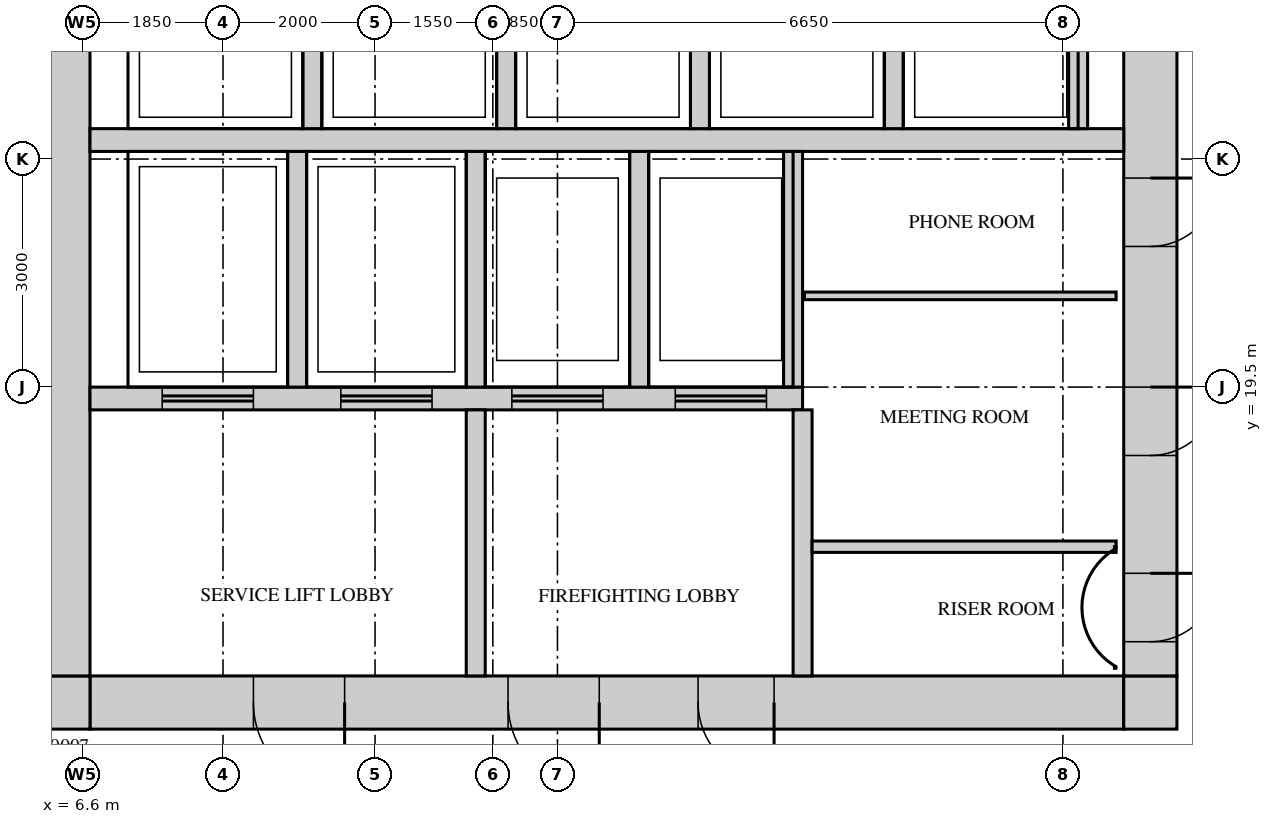
"""IFC4 building model, lengths in metres.
Left out: names, types, materials, properties, quantities, classifications, styles, units other than length and angle.
Written with IfcOpenShell. Run it as: python <this file> out.ifc"""

import sys

from ifc_helpers import new_model, si_unit, direction, frame, frame_2d, origin, place, context, subcontext, project, spatial, rectangle, extrude, source, transform, mapped, element, fill, save


model = new_model("IFC4")
c1 = context("Model", 3, precision=1e-05, world=origin(), true_north=direction((0.0, 1.0)))
c2 = subcontext(c1, "Body", "Model", "MODEL_VIEW")
j1 = project(units=[si_unit("LENGTHUNIT", "METRE"), si_unit("PLANEANGLEUNIT", "RADIAN")], contexts=[c1])
p1 = place(None, origin())
s1 = spatial("IfcSite", under=j1, at=p1, CompositionType="ELEMENT")
p2 = place(p1, origin())
s2 = spatial("IfcBuilding", under=s1, at=p2, CompositionType="ELEMENT")
p3 = place(p2, frame((0.0, 0.0, 250.2)))
s3 = spatial("IfcBuildingStorey", under=s2, at=p3, CompositionType="ELEMENT", Elevation=250.2)
m1 = source(origin(), c2, "Body", "SweptSolid", [
    extrude(rectangle(XDim=13.6, YDim=0.7, at=frame_2d((6.8, 0.0))), origin(), (0.0, 0.0, 1.0), 3.75),
])
p4 = place(p3, frame((6.7, 15.35, 0.0), z_axis=(0.0, 0.0, 1.0), x_axis=(1.0, 0.0, 0.0)))
e1 = element("IfcWall", 1, at=p4, inside=s3, PredefinedType="SHEAR", context=c2, shape_type="MappedRepresentation", body=[
    mapped(m1, transform((0.0, 0.0, 0.0))),
])
m2 = source(origin(), c2, "Body", "SweptSolid", [
    extrude(rectangle(XDim=1.2, YDim=2.1, at=frame_2d((0.6, 1.05))), frame((0.0, 0.36, 0.0), z_axis=(0.0, -1.0, 0.0), x_axis=(1.0, 0.0, 0.0)), (0.0, 0.0, 1.0), 0.72),
])
p5 = place(p4, frame((5.5, 0.0, 0.0)))
e2 = element("IfcOpeningElement", 2, at=p5, cuts=e1, PredefinedType="OPENING", context=c2, shape_type="MappedRepresentation", body=[
    mapped(m2, transform((0.0, 0.0, 0.0))),
])
p6 = place(p4, frame((2.15, 0.0, 0.0)))
e3 = element("IfcOpeningElement", 3, at=p6, cuts=e1, PredefinedType="OPENING", context=c2, shape_type="MappedRepresentation", body=[
    mapped(m2, transform((0.0, 0.0, 0.0))),
])
m3 = source(origin(), c2, "Body", "SweptSolid", [
    extrude(rectangle(XDim=1.0, YDim=2.1, at=frame_2d((0.5, 1.05))), frame((0.0, 0.36, 0.0), z_axis=(0.0, -1.0, 0.0), x_axis=(1.0, 0.0, 0.0)), (0.0, 0.0, 1.0), 0.72),
])
p7 = place(p4, frame((8.0, 0.0, 0.0)))
e4 = element("IfcOpeningElement", 4, at=p7, cuts=e1, PredefinedType="OPENING", context=c2, shape_type="MappedRepresentation", body=[
    mapped(m3, transform((0.0, 0.0, 0.0))),
])
m4 = source(origin(), c2, "Body", "SweptSolid", [
    extrude(rectangle(XDim=0.7, YDim=0.7, at=frame_2d((0.35, 0.0))), origin(), (0.0, 0.0, 1.0), 3.75),
])
for number, where, z_axis, x_axis in (
    (5, (20.3, 15.35, 0.0), (0.0, 0.0, 1.0), (1.0, 0.0, 0.0)),
    (6, (6.0, 15.35, 0.0), (0.0, 0.0, 1.0), (1.0, 0.0, 0.0)),
):
    element("IfcWall", number, at=place(p3, frame(where, z_axis=z_axis, x_axis=x_axis)), inside=s3, PredefinedType="SHEAR", context=c2, shape_type="MappedRepresentation", body=[
        mapped(m4, transform((0.0, 0.0, 0.0))),
    ])
m5 = source(origin(), c2, "Body", "SweptSolid", [
    extrude(rectangle(XDim=22.6, YDim=0.7, at=frame_2d((11.3, 0.0))), origin(), (0.0, 0.0, 1.0), 3.75),
])
p8 = place(p3, frame((20.65, 15.7, 0.0), z_axis=(0.0, 0.0, 1.0), x_axis=(0.0, 1.0, 0.0)))
e7 = element("IfcWall", 7, at=p8, inside=s3, PredefinedType="SHEAR", context=c2, shape_type="MappedRepresentation", body=[
    mapped(m5, transform((0.0, 0.0, 0.0))),
])
m6 = source(origin(), c2, "Body", "SweptSolid", [
    extrude(rectangle(XDim=1.8, YDim=2.1, at=frame_2d((0.9, 1.05))), frame((0.0, 0.36, 0.0), z_axis=(0.0, -1.0, 0.0), x_axis=(1.0, 0.0, 0.0)), (0.0, 0.0, 1.0), 0.72),
])
p9 = place(p8, frame((10.8, 0.0, 0.0)))
e8 = element("IfcOpeningElement", 8, at=p9, cuts=e7, PredefinedType="OPENING", context=c2, shape_type="MappedRepresentation", body=[
    mapped(m6, transform((0.0, 0.0, 0.0))),
])
m7 = source(origin(), c2, "Body", "SweptSolid", [
    extrude(rectangle(XDim=0.9, YDim=2.1, at=frame_2d((0.45, 1.05))), frame((0.0, 0.36, 0.0), z_axis=(0.0, -1.0, 0.0), x_axis=(1.0, 0.0, 0.0)), (0.0, 0.0, 1.0), 0.72),
])
p10 = place(p8, frame((0.45, 0.0, 0.0)))
e9 = element("IfcOpeningElement", 9, at=p10, cuts=e7, PredefinedType="OPENING", context=c2, shape_type="MappedRepresentation", body=[
    mapped(m7, transform((0.0, 0.0, 0.0))),
])
p11 = place(p8, frame((2.9, 0.0, 0.0)))
e10 = element("IfcOpeningElement", 10, at=p11, cuts=e7, PredefinedType="OPENING", context=c2, shape_type="MappedRepresentation", body=[
    mapped(m7, transform((0.0, 0.0, 0.0))),
])
p12 = place(p8, frame((5.65, 0.0, 0.0)))
e11 = element("IfcOpeningElement", 11, at=p12, cuts=e7, PredefinedType="OPENING", context=c2, shape_type="MappedRepresentation", body=[
    mapped(m7, transform((0.0, 0.0, 0.0))),
])
p13 = place(p3, frame((6.35, 15.7, 0.0), z_axis=(0.0, 0.0, 1.0), x_axis=(0.0, 1.0, 0.0)))
e12 = element("IfcWall", 12, at=p13, inside=s3, PredefinedType="SHEAR", context=c2, shape_type="MappedRepresentation", body=[
    mapped(m5, transform((0.0, 0.0, 0.0))),
])
m8 = source(origin(), c2, "Body", "SweptSolid", [
    extrude(rectangle(XDim=13.6, YDim=0.3, at=frame_2d((6.8, 0.0))), origin(), (0.0, 0.0, 1.0), 3.75),
])
p14 = place(p3, frame((6.7, 22.75, 0.0), z_axis=(0.0, 0.0, 1.0), x_axis=(1.0, 0.0, 0.0)))
e13 = element("IfcWall", 13, at=p14, inside=s3, PredefinedType="STANDARD", context=c2, shape_type="MappedRepresentation", body=[
    mapped(m8, transform((0.0, 0.0, 0.0))),
])
m9 = source(origin(), c2, "Body", "SweptSolid", [
    extrude(rectangle(XDim=9.375, YDim=0.3, at=frame_2d((4.688, 0.0))), origin(), (0.0, 0.0, 1.0), 3.75),
])
p15 = place(p3, frame((6.7, 19.35, 0.0), z_axis=(0.0, 0.0, 1.0), x_axis=(1.0, 0.0, 0.0)))
e14 = element("IfcWall", 14, at=p15, inside=s3, PredefinedType="STANDARD", context=c2, shape_type="MappedRepresentation", body=[
    mapped(m9, transform((0.0, 0.0, 0.0))),
])
m10 = source(origin(), c2, "Body", "SweptSolid", [
    extrude(rectangle(XDim=1.2, YDim=2.1, at=frame_2d((0.6, 1.05))), frame((0.0, 0.16, 0.0), z_axis=(0.0, -1.0, 0.0), x_axis=(1.0, 0.0, 0.0)), (0.0, 0.0, 1.0), 0.32),
])
p16 = place(p15, frame((0.95, 0.0, 0.0)))
e15 = element("IfcOpeningElement", 15, at=p16, cuts=e14, PredefinedType="OPENING", context=c2, shape_type="MappedRepresentation", body=[
    mapped(m10, transform((0.0, 0.0, 0.0))),
])
p17 = place(p15, frame((3.3, 0.0, 0.0)))
e16 = element("IfcOpeningElement", 16, at=p17, cuts=e14, PredefinedType="OPENING", context=c2, shape_type="MappedRepresentation", body=[
    mapped(m10, transform((0.0, 0.0, 0.0))),
])
p18 = place(p15, frame((5.55, 0.0, 0.0)))
e17 = element("IfcOpeningElement", 17, at=p18, cuts=e14, PredefinedType="OPENING", context=c2, shape_type="MappedRepresentation", body=[
    mapped(m10, transform((0.0, 0.0, 0.0))),
])
p19 = place(p15, frame((7.7, 0.0, 0.0)))
e18 = element("IfcOpeningElement", 18, at=p19, cuts=e14, PredefinedType="OPENING", context=c2, shape_type="MappedRepresentation", body=[
    mapped(m10, transform((0.0, 0.0, 0.0))),
])
m11 = source(origin(), c2, "Body", "SweptSolid", [
    extrude(rectangle(XDim=3.1, YDim=0.25, at=frame_2d((1.55, 0.0))), origin(), (0.0, 0.0, 1.0), 3.75),
])
for number, where, z_axis, x_axis in (
    (19, (9.425, 19.5, 0.0), (0.0, 0.0, 1.0), (0.0, 1.0, 0.0)),
    (20, (11.775, 19.5, 0.0), (0.0, 0.0, 1.0), (0.0, 1.0, 0.0)),
    (21, (13.925, 19.5, 0.0), (0.0, 0.0, 1.0), (0.0, 1.0, 0.0)),
    (22, (15.95, 19.5, 0.0), (0.0, 0.0, 1.0), (0.0, 1.0, 0.0)),
):
    element("IfcWall", number, at=place(p3, frame(where, z_axis=z_axis, x_axis=x_axis)), inside=s3, PredefinedType="STANDARD", context=c2, shape_type="MappedRepresentation", body=[
        mapped(m11, transform((0.0, 0.0, 0.0))),
    ])
m12 = source(origin(), c2, "Body", "SweptSolid", [
    extrude(rectangle(XDim=2.4, YDim=0.25, at=frame_2d((1.2, 0.0))), origin(), (0.0, 0.0, 1.0), 3.75),
])
for number, where, z_axis, x_axis in (
    (23, (17.275, 22.9, 0.0), (0.0, 0.0, 1.0), (0.0, 1.0, 0.0)),
    (24, (19.7, 22.9, 0.0), (0.0, 0.0, 1.0), (0.0, 1.0, 0.0)),
    (25, (9.625, 22.9, 0.0), (0.0, 0.0, 1.0), (0.0, 1.0, 0.0)),
    (26, (12.175, 22.9, 0.0), (0.0, 0.0, 1.0), (0.0, 1.0, 0.0)),
    (27, (14.725, 22.9, 0.0), (0.0, 0.0, 1.0), (0.0, 1.0, 0.0)),
):
    element("IfcWall", number, at=place(p3, frame(where, z_axis=z_axis, x_axis=x_axis)), inside=s3, PredefinedType="STANDARD", context=c2, shape_type="MappedRepresentation", body=[
        mapped(m12, transform((0.0, 0.0, 0.0))),
    ])
m13 = source(origin(), c2, "Body", "SweptSolid", [
    extrude(rectangle(XDim=3.5, YDim=0.25, at=frame_2d((1.75, 0.0))), origin(), (0.0, 0.0, 1.0), 3.75),
])
for number, where, z_axis, x_axis in (
    (28, (16.075, 15.7, 0.0), (0.0, 0.0, 1.0), (0.0, 1.0, 0.0)),
    (29, (11.775, 15.7, 0.0), (0.0, 0.0, 1.0), (0.0, 1.0, 0.0)),
):
    element("IfcWall", number, at=place(p3, frame(where, z_axis=z_axis, x_axis=x_axis)), inside=s3, PredefinedType="STANDARD", context=c2, shape_type="MappedRepresentation", body=[
        mapped(m13, transform((0.0, 0.0, 0.0))),
    ])
m14 = source(origin(), c2, "Body", "SweptSolid", [
    extrude(rectangle(XDim=4.0, YDim=0.15, at=frame_2d((2.0, 0.0))), origin(), (0.0, 0.0, 1.0), 3.8),
])
p20 = place(p3, frame((16.2, 17.4, 0.0), z_axis=(0.0, 0.0, 1.0), x_axis=(1.0, 0.0, 0.0)))
e30 = element("IfcWall", 30, at=p20, inside=s3, PredefinedType="PARTITIONING", context=c2, shape_type="MappedRepresentation", body=[
    mapped(m14, transform((0.0, 0.0, 0.0))),
])
m15 = source(origin(), c2, "Body", "SweptSolid", [
    extrude(rectangle(XDim=4.1, YDim=0.1, at=frame_2d((2.05, 0.0))), origin(), (0.0, 0.0, 1.0), 3.8),
])
p21 = place(p3, frame((16.1, 20.7, 0.0), z_axis=(0.0, 0.0, 1.0), x_axis=(1.0, 0.0, 0.0)))
e31 = element("IfcWall", 31, at=p21, inside=s3, PredefinedType="PARTITIONING", context=c2, shape_type="MappedRepresentation", body=[
    mapped(m15, transform((0.0, 0.0, 0.0))),
])
m16 = source(origin(), c2, "Body", "SweptSolid", [
    extrude(rectangle(XDim=0.9, YDim=2.1, at=frame_2d((0.45, 1.05))), frame((0.0, 0.3, 0.0), z_axis=(0.0, -1.0, 0.0), x_axis=(1.0, 0.0, 0.0)), (0.0, 0.0, 1.0), 0.6),
])
p22 = place(p10, origin())
e32 = element("IfcDoor", 32, at=p22, inside=s3, OperationType="SINGLE_SWING_RIGHT", PredefinedType="DOOR", context=c2, shape_type="MappedRepresentation", body=[
    mapped(m16, transform((0.0, 0.0, 0.0))),
])
fill(e9, e32)
p23 = place(p11, origin())
e33 = element("IfcDoor", 33, at=p23, inside=s3, OperationType="SINGLE_SWING_RIGHT", PredefinedType="DOOR", context=c2, shape_type="MappedRepresentation", body=[
    mapped(m16, transform((0.0, 0.0, 0.0))),
])
fill(e10, e33)
p24 = place(p12, origin())
e34 = element("IfcDoor", 34, at=p24, inside=s3, OperationType="SINGLE_SWING_RIGHT", PredefinedType="DOOR", context=c2, shape_type="MappedRepresentation", body=[
    mapped(m16, transform((0.0, 0.0, 0.0))),
])
fill(e11, e34)
m17 = source(origin(), c2, "Body", "SweptSolid", [
    extrude(rectangle(XDim=1.2, YDim=2.1, at=frame_2d((0.6, 1.05))), frame((0.0, 0.3, 0.0), z_axis=(0.0, -1.0, 0.0), x_axis=(1.0, 0.0, 0.0)), (0.0, 0.0, 1.0), 0.6),
])
p25 = place(p5, origin())
e35 = element("IfcDoor", 35, at=p25, inside=s3, OperationType="SINGLE_SWING_RIGHT", PredefinedType="DOOR", context=c2, shape_type="MappedRepresentation", body=[
    mapped(m17, transform((0.0, 0.0, 0.0))),
])
fill(e2, e35)
p26 = place(p6, origin())
e36 = element("IfcDoor", 36, at=p26, inside=s3, OperationType="SINGLE_SWING_RIGHT", PredefinedType="DOOR", context=c2, shape_type="MappedRepresentation", body=[
    mapped(m17, transform((0.0, 0.0, 0.0))),
])
fill(e3, e36)
m18 = source(origin(), c2, "Body", "SweptSolid", [
    extrude(rectangle(XDim=1.0, YDim=2.1, at=frame_2d((0.5, 1.05))), frame((0.0, 0.3, 0.0), z_axis=(0.0, -1.0, 0.0), x_axis=(1.0, 0.0, 0.0)), (0.0, 0.0, 1.0), 0.6),
])
p27 = place(p7, origin())
e37 = element("IfcDoor", 37, at=p27, inside=s3, OperationType="SINGLE_SWING_RIGHT", PredefinedType="DOOR", context=c2, shape_type="MappedRepresentation", body=[
    mapped(m18, transform((0.0, 0.0, 0.0))),
])
fill(e4, e37)
m19 = source(origin(), c2, "Body", "SweptSolid", [
    extrude(rectangle(XDim=1.2, YDim=2.1, at=frame_2d((0.6, 1.05))), frame((0.0, 0.025, 0.0), z_axis=(0.0, -1.0, 0.0), x_axis=(1.0, 0.0, 0.0)), (0.0, 0.0, 1.0), 0.05),
])
p28 = place(p16, origin())
e38 = element("IfcDoor", 38, at=p28, inside=s3, OperationType="DOUBLE_DOOR_SLIDING", PredefinedType="DOOR", context=c2, shape_type="MappedRepresentation", body=[
    mapped(m19, transform((0.0, 0.0, 0.0))),
])
fill(e15, e38)
p29 = place(p17, origin())
e39 = element("IfcDoor", 39, at=p29, inside=s3, OperationType="DOUBLE_DOOR_SLIDING", PredefinedType="DOOR", context=c2, shape_type="MappedRepresentation", body=[
    mapped(m19, transform((0.0, 0.0, 0.0))),
])
fill(e16, e39)
p30 = place(p18, origin())
e40 = element("IfcDoor", 40, at=p30, inside=s3, OperationType="DOUBLE_DOOR_SLIDING", PredefinedType="DOOR", context=c2, shape_type="MappedRepresentation", body=[
    mapped(m19, transform((0.0, 0.0, 0.0))),
])
fill(e17, e40)
p31 = place(p19, origin())
e41 = element("IfcDoor", 41, at=p31, inside=s3, OperationType="DOUBLE_DOOR_SLIDING", PredefinedType="DOOR", context=c2, shape_type="MappedRepresentation", body=[
    mapped(m19, transform((0.0, 0.0, 0.0))),
])
fill(e18, e41)
save(model, sys.argv[1])
